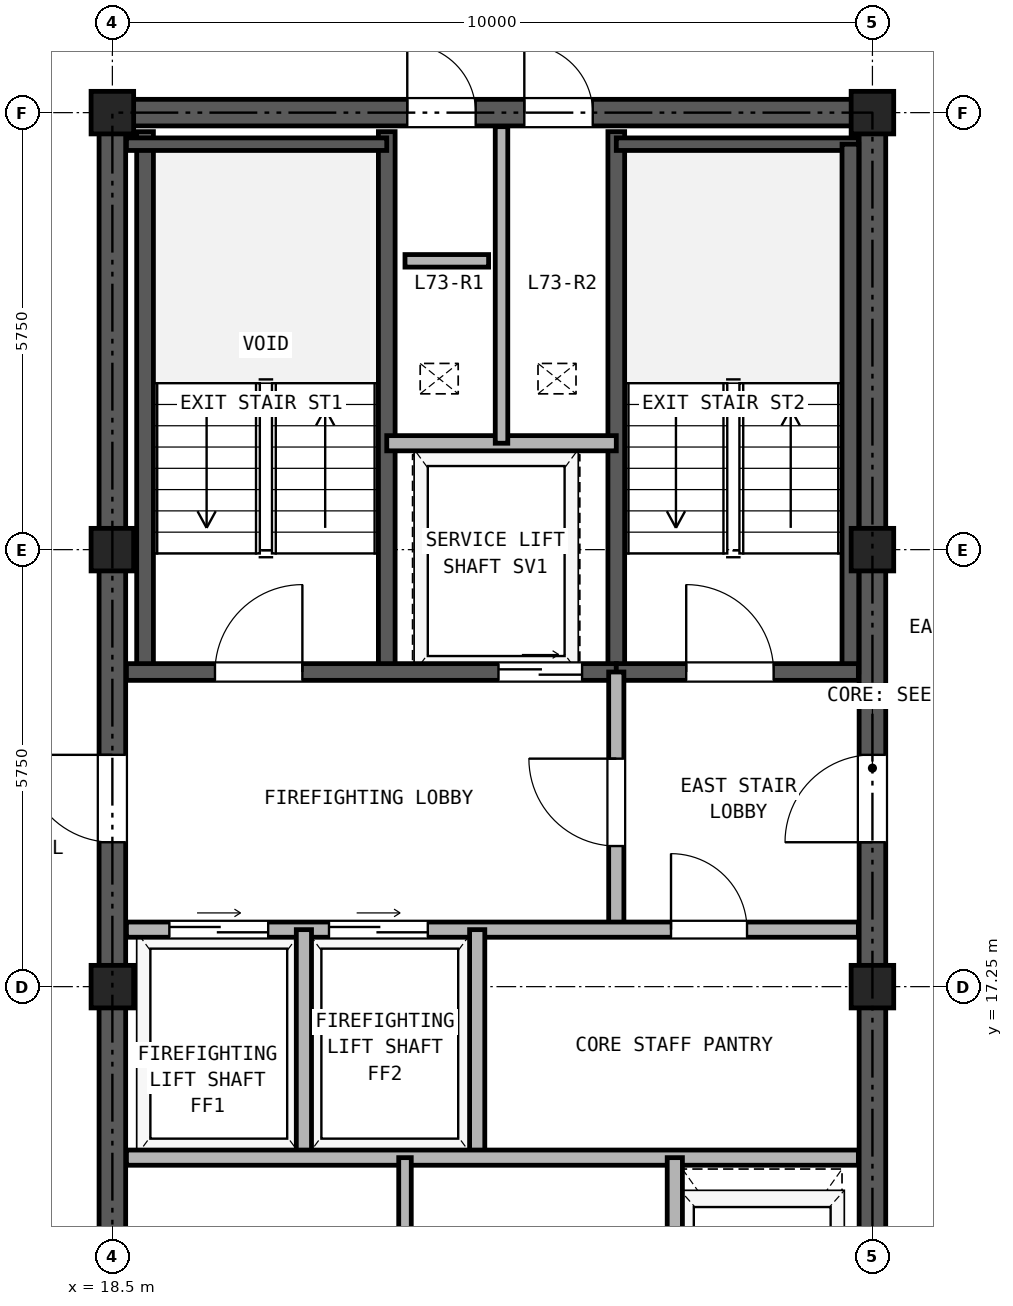
"""IFC4 building model, lengths in metres.
Left out: names, types, materials, properties, quantities, classifications, styles, units other than length and angle.
Written with IfcOpenShell. Run it as: python <this file> out.ifc"""

import sys

from ifc_helpers import new_model, si_unit, direction, frame, frame_2d, origin, origin_2d, place, context, subcontext, project, spatial, rectangle, hollow_rectangle, extrude, source, transform, mapped, element, fill, save


model = new_model("IFC4")
c1 = context("Model", 3, precision=1e-05, world=origin(), true_north=direction((0.0, 1.0)))
c2 = subcontext(c1, "Body", "Model", "MODEL_VIEW")
j1 = project(units=[si_unit("LENGTHUNIT", "METRE"), si_unit("PLANEANGLEUNIT", "RADIAN")], contexts=[c1])
p1 = place(None, origin())
s1 = spatial("IfcSite", under=j1, at=p1, CompositionType="ELEMENT")
p2 = place(p1, origin())
s2 = spatial("IfcBuilding", under=s1, at=p2, CompositionType="ELEMENT")
p3 = place(p2, frame((0.0, 0.0, 255.3)))
s3 = spatial("IfcBuildingStorey", under=s2, at=p3, CompositionType="ELEMENT", Elevation=255.3)
m1 = source(origin(), c2, "Body", "SweptSolid", [
    extrude(hollow_rectangle(XDim=0.56, YDim=0.56, WallThickness=0.03, at=origin_2d()), origin(), (0.0, 0.0, 1.0), 2.98),
])
for number, where, z_axis, x_axis in (
    (1, (18.5, 17.25, 0.0), (0.0, 0.0, 1.0), (1.0, 0.0, 0.0)),
    (2, (18.5, 23.0, 0.0), (0.0, 0.0, 1.0), (1.0, 0.0, 0.0)),
    (3, (18.5, 28.75, 0.0), (0.0, 0.0, 1.0), (1.0, 0.0, 0.0)),
    (4, (28.5, 17.25, 0.0), (0.0, 0.0, 1.0), (1.0, 0.0, 0.0)),
    (5, (28.5, 23.0, 0.0), (0.0, 0.0, 1.0), (1.0, 0.0, 0.0)),
    (6, (28.5, 28.75, 0.0), (0.0, 0.0, 1.0), (1.0, 0.0, 0.0)),
):
    element("IfcColumn", number, at=place(p3, frame(where, z_axis=z_axis, x_axis=x_axis)), inside=s3, PredefinedType="COLUMN", context=c2, shape_type="MappedRepresentation", body=[
        mapped(m1, transform((0.0, 0.0, 0.0), x_axis=(1.0, 0.0, 0.0), y_axis=(0.0, 1.0, 0.0), z_axis=(0.0, 0.0, 1.0), scale=1.0)),
    ])
p4 = place(p3, frame((18.325, 28.75, 0.0), z_axis=(0.0, 0.0, 1.0), x_axis=(1.0, 0.0, 0.0)))
e7 = element("IfcWall", 7, at=p4, inside=s3, PredefinedType="SHEAR", context=c2, shape_type="SweptSolid", body=[
    extrude(rectangle(XDim=10.35, YDim=0.35, at=frame_2d((5.175, 0.0))), origin(), (0.0, 0.0, 1.0), 2.98),
])
p5 = place(p4, frame((4.055, 0.0, 0.0)))
e8 = element("IfcOpeningElement", 8, at=p5, cuts=e7, PredefinedType="OPENING", context=c2, shape_type="SweptSolid", body=[
    extrude(rectangle(XDim=0.9, YDim=2.05, at=frame_2d((0.45, 1.025))), frame((0.0, 0.185, 0.0), z_axis=(0.0, -1.0, 0.0), x_axis=(1.0, 0.0, 0.0)), (0.0, 0.0, 1.0), 0.37),
])
p6 = place(p4, frame((5.595, 0.0, 0.0)))
e9 = element("IfcOpeningElement", 9, at=p6, cuts=e7, PredefinedType="OPENING", context=c2, shape_type="SweptSolid", body=[
    extrude(rectangle(XDim=0.9, YDim=2.05, at=frame_2d((0.45, 1.025))), frame((0.0, 0.185, 0.0), z_axis=(0.0, -1.0, 0.0), x_axis=(1.0, 0.0, 0.0)), (0.0, 0.0, 1.0), 0.37),
])
p7 = place(p3, frame((18.5, 11.675, 0.0), z_axis=(0.0, 0.0, 1.0), x_axis=(0.0, 1.0, 0.0)))
e10 = element("IfcWall", 10, at=p7, inside=s3, PredefinedType="SHEAR", context=c2, shape_type="SweptSolid", body=[
    extrude(rectangle(XDim=16.9, YDim=0.35, at=frame_2d((8.45, 0.0))), origin(), (0.0, 0.0, 1.0), 2.98),
])
p8 = place(p7, frame((7.475, 0.0, 0.0)))
e11 = element("IfcOpeningElement", 11, at=p8, cuts=e10, PredefinedType="OPENING", context=c2, shape_type="SweptSolid", body=[
    extrude(rectangle(XDim=1.15, YDim=2.2, at=frame_2d((0.575, 1.1))), frame((0.0, 0.185, 0.0), z_axis=(0.0, -1.0, 0.0), x_axis=(1.0, 0.0, 0.0)), (0.0, 0.0, 1.0), 0.37),
])
p9 = place(p3, frame((28.5, 11.675, 0.0), z_axis=(0.0, 0.0, 1.0), x_axis=(0.0, 1.0, 0.0)))
e12 = element("IfcWall", 12, at=p9, inside=s3, PredefinedType="SHEAR", context=c2, shape_type="SweptSolid", body=[
    extrude(rectangle(XDim=16.9, YDim=0.35, at=frame_2d((8.45, 0.0))), origin(), (0.0, 0.0, 1.0), 2.98),
])
p10 = place(p9, frame((7.475, 0.0, 0.0)))
e13 = element("IfcOpeningElement", 13, at=p10, cuts=e12, PredefinedType="OPENING", context=c2, shape_type="SweptSolid", body=[
    extrude(rectangle(XDim=1.15, YDim=2.2, at=frame_2d((0.575, 1.1))), frame((0.0, 0.185, 0.0), z_axis=(0.0, -1.0, 0.0), x_axis=(1.0, 0.0, 0.0)), (0.0, 0.0, 1.0), 0.37),
])
for number, where, z_axis, x_axis in (
    (14, (18.93, 21.39, 0.0), (0.0, 0.0, 1.0), (0.0, 1.0, 0.0)),
    (15, (22.11, 21.39, 0.0), (0.0, 0.0, 1.0), (0.0, 1.0, 0.0)),
    (16, (25.13, 21.39, 0.0), (0.0, 0.0, 1.0), (0.0, 1.0, 0.0)),
):
    element("IfcWall", number, at=place(p3, frame(where, z_axis=z_axis, x_axis=x_axis)), inside=s3, PredefinedType="SOLIDWALL", context=c2, shape_type="SweptSolid", body=[
        extrude(rectangle(XDim=7.11, YDim=0.22, at=frame_2d((3.555, 0.0))), origin(), (0.0, 0.0, 1.0), 2.98),
    ])
p11 = place(p3, frame((18.685, 28.335, 0.0), z_axis=(0.0, 0.0, 1.0), x_axis=(1.0, 0.0, 0.0)))
e17 = element("IfcWall", 17, at=p11, inside=s3, PredefinedType="PARTITIONING", context=c2, shape_type="SweptSolid", body=[
    extrude(rectangle(XDim=3.425, YDim=0.165, at=frame_2d((1.712, 0.0))), origin(), (0.0, 0.0, 1.0), 2.98),
])
p12 = place(p3, frame((25.13, 28.335, 0.0), z_axis=(0.0, 0.0, 1.0), x_axis=(1.0, 0.0, 0.0)))
e18 = element("IfcWall", 18, at=p12, inside=s3, PredefinedType="PARTITIONING", context=c2, shape_type="SweptSolid", body=[
    extrude(rectangle(XDim=3.185, YDim=0.165, at=frame_2d((1.593, 0.0))), origin(), (0.0, 0.0, 1.0), 2.98),
])
p13 = place(p3, frame((28.21, 21.39, 0.0), z_axis=(0.0, 0.0, 1.0), x_axis=(0.0, 1.0, 0.0)))
e19 = element("IfcWall", 19, at=p13, inside=s3, PredefinedType="SOLIDWALL", context=c2, shape_type="SweptSolid", body=[
    extrude(rectangle(XDim=6.945, YDim=0.22, at=frame_2d((3.473, 0.0))), origin(), (0.0, 0.0, 1.0), 2.98),
])
p14 = place(p3, frame((18.685, 21.39, 0.0), z_axis=(0.0, 0.0, 1.0), x_axis=(1.0, 0.0, 0.0)))
e20 = element("IfcWall", 20, at=p14, inside=s3, PredefinedType="SOLIDWALL", context=c2, shape_type="SweptSolid", body=[
    extrude(rectangle(XDim=6.445, YDim=0.22, at=frame_2d((3.222, 0.0))), origin(), (0.0, 0.0, 1.0), 2.98),
])
p15 = place(p14, frame((1.165, 0.0, 0.0)))
e21 = element("IfcOpeningElement", 21, at=p15, cuts=e20, PredefinedType="OPENING", context=c2, shape_type="SweptSolid", body=[
    extrude(rectangle(XDim=1.15, YDim=2.2, at=frame_2d((0.575, 1.1))), frame((0.0, 0.12, 0.0), z_axis=(0.0, -1.0, 0.0), x_axis=(1.0, 0.0, 0.0)), (0.0, 0.0, 1.0), 0.24),
])
p16 = place(p14, frame((4.895, 0.0, 0.0)))
e22 = element("IfcOpeningElement", 22, at=p16, cuts=e20, PredefinedType="OPENING", context=c2, shape_type="SweptSolid", body=[
    extrude(rectangle(XDim=1.1, YDim=2.25, at=frame_2d((0.55, 1.125))), frame((0.0, 0.12, 0.0), z_axis=(0.0, -1.0, 0.0), x_axis=(1.0, 0.0, 0.0)), (0.0, 0.0, 1.0), 0.24),
])
p17 = place(p3, frame((25.13, 21.39, 0.0), z_axis=(0.0, 0.0, 1.0), x_axis=(1.0, 0.0, 0.0)))
e23 = element("IfcWall", 23, at=p17, inside=s3, PredefinedType="SOLIDWALL", context=c2, shape_type="SweptSolid", body=[
    extrude(rectangle(XDim=3.185, YDim=0.22, at=frame_2d((1.593, 0.0))), origin(), (0.0, 0.0, 1.0), 2.98),
])
p18 = place(p17, frame((0.92, 0.0, 0.0)))
e24 = element("IfcOpeningElement", 24, at=p18, cuts=e23, PredefinedType="OPENING", context=c2, shape_type="SweptSolid", body=[
    extrude(rectangle(XDim=1.15, YDim=2.2, at=frame_2d((0.575, 1.1))), frame((0.0, 0.12, 0.0), z_axis=(0.0, -1.0, 0.0), x_axis=(1.0, 0.0, 0.0)), (0.0, 0.0, 1.0), 0.24),
])
p19 = place(p3, frame((22.11, 24.4, 0.0), z_axis=(0.0, 0.0, 1.0), x_axis=(1.0, 0.0, 0.0)))
e25 = element("IfcWall", 25, at=p19, inside=s3, PredefinedType="PARTITIONING", context=c2, shape_type="SweptSolid", body=[
    extrude(rectangle(XDim=3.02, YDim=0.2, at=frame_2d((1.51, 0.0))), origin(), (0.0, 0.0, 1.0), 2.98),
])
p20 = place(p3, frame((23.62, 24.4, 0.0), z_axis=(0.0, 0.0, 1.0), x_axis=(0.0, 1.0, 0.0)))
e26 = element("IfcWall", 26, at=p20, inside=s3, PredefinedType="PARTITIONING", context=c2, shape_type="SweptSolid", body=[
    extrude(rectangle(XDim=4.165, YDim=0.165, at=frame_2d((2.083, 0.0))), origin(), (0.0, 0.0, 1.0), 2.98),
])
p21 = place(p3, frame((25.13, 18.0, 0.0), z_axis=(0.0, 0.0, 1.0), x_axis=(0.0, 1.0, 0.0)))
e27 = element("IfcWall", 27, at=p21, inside=s3, PredefinedType="PARTITIONING", context=c2, shape_type="SweptSolid", body=[
    extrude(rectangle(XDim=3.39, YDim=0.2, at=frame_2d((1.695, 0.0))), origin(), (0.0, 0.0, 1.0), 2.98),
])
p22 = place(p21, frame((1.1, 0.0, 0.0)))
e28 = element("IfcOpeningElement", 28, at=p22, cuts=e27, PredefinedType="OPENING", context=c2, shape_type="SweptSolid", body=[
    extrude(rectangle(XDim=1.15, YDim=2.2, at=frame_2d((0.575, 1.1))), frame((0.0, 0.11, 0.0), z_axis=(0.0, -1.0, 0.0), x_axis=(1.0, 0.0, 0.0)), (0.0, 0.0, 1.0), 0.22),
])
p23 = place(p3, frame((18.685, 18.0, 0.0), z_axis=(0.0, 0.0, 1.0), x_axis=(1.0, 0.0, 0.0)))
e29 = element("IfcWall", 29, at=p23, inside=s3, PredefinedType="PARTITIONING", context=c2, shape_type="SweptSolid", body=[
    extrude(rectangle(XDim=9.63, YDim=0.2, at=frame_2d((4.815, 0.0))), origin(), (0.0, 0.0, 1.0), 2.98),
])
p24 = place(p23, frame((0.565, 0.0, 0.0)))
e30 = element("IfcOpeningElement", 30, at=p24, cuts=e29, PredefinedType="OPENING", context=c2, shape_type="SweptSolid", body=[
    extrude(rectangle(XDim=1.3, YDim=2.3, at=frame_2d((0.65, 1.15))), frame((0.0, 0.11, 0.0), z_axis=(0.0, -1.0, 0.0), x_axis=(1.0, 0.0, 0.0)), (0.0, 0.0, 1.0), 0.22),
])
p25 = place(p23, frame((2.665, 0.0, 0.0)))
e31 = element("IfcOpeningElement", 31, at=p25, cuts=e29, PredefinedType="OPENING", context=c2, shape_type="SweptSolid", body=[
    extrude(rectangle(XDim=1.3, YDim=2.3, at=frame_2d((0.65, 1.15))), frame((0.0, 0.11, 0.0), z_axis=(0.0, -1.0, 0.0), x_axis=(1.0, 0.0, 0.0)), (0.0, 0.0, 1.0), 0.22),
])
p26 = place(p23, frame((7.165, 0.0, 0.0)))
e32 = element("IfcOpeningElement", 32, at=p26, cuts=e29, PredefinedType="OPENING", context=c2, shape_type="SweptSolid", body=[
    extrude(rectangle(XDim=1.0, YDim=2.15, at=frame_2d((0.5, 1.075))), frame((0.0, 0.11, 0.0), z_axis=(0.0, -1.0, 0.0), x_axis=(1.0, 0.0, 0.0)), (0.0, 0.0, 1.0), 0.22),
])
for number, where, z_axis, x_axis in (
    (33, (21.02, 15.0, 0.0), (0.0, 0.0, 1.0), (0.0, 1.0, 0.0)),
    (34, (23.3, 15.0, 0.0), (0.0, 0.0, 1.0), (0.0, 1.0, 0.0)),
):
    element("IfcWall", number, at=place(p3, frame(where, z_axis=z_axis, x_axis=x_axis)), inside=s3, PredefinedType="PARTITIONING", context=c2, shape_type="SweptSolid", body=[
        extrude(rectangle(XDim=3.0, YDim=0.2, at=frame_2d((1.5, 0.0))), origin(), (0.0, 0.0, 1.0), 2.98),
    ])
p27 = place(p3, frame((18.685, 15.0, 0.0), z_axis=(0.0, 0.0, 1.0), x_axis=(1.0, 0.0, 0.0)))
e35 = element("IfcWall", 35, at=p27, inside=s3, PredefinedType="PARTITIONING", context=c2, shape_type="SweptSolid", body=[
    extrude(rectangle(XDim=9.63, YDim=0.2, at=frame_2d((4.815, 0.0))), origin(), (0.0, 0.0, 1.0), 2.98),
])
p28 = place(p3, frame((22.35, 11.685, 0.0), z_axis=(0.0, 0.0, 1.0), x_axis=(0.0, 1.0, 0.0)))
e36 = element("IfcWall", 36, at=p28, inside=s3, PredefinedType="PARTITIONING", context=c2, shape_type="SweptSolid", body=[
    extrude(rectangle(XDim=3.315, YDim=0.165, at=frame_2d((1.657, 0.0))), origin(), (0.0, 0.0, 1.0), 2.98),
])
p29 = place(p3, frame((25.9, 11.685, 0.0), z_axis=(0.0, 0.0, 1.0), x_axis=(0.0, 1.0, 0.0)))
e37 = element("IfcWall", 37, at=p29, inside=s3, PredefinedType="PARTITIONING", context=c2, shape_type="SweptSolid", body=[
    extrude(rectangle(XDim=3.315, YDim=0.2, at=frame_2d((1.657, 0.0))), origin(), (0.0, 0.0, 1.0), 2.98),
])
p30 = place(p3, frame((22.35, 26.8, 0.0), z_axis=(0.0, 0.0, 1.0), x_axis=(1.0, 0.0, 0.0)))
e38 = element("IfcWall", 38, at=p30, inside=s3, PredefinedType="PARTITIONING", context=c2, shape_type="SweptSolid", body=[
    extrude(rectangle(XDim=1.1, YDim=0.165, at=frame_2d((0.55, 0.0))), origin(), (0.0, 0.0, 1.0), 2.98),
])
p31 = place(p15, frame((1.15, 0.0, 0.0), z_axis=(0.0, 0.0, 1.0), x_axis=(-1.0, 0.0, 0.0)))
e39 = element("IfcDoor", 39, at=p31, inside=s3, OperationType="SINGLE_SWING_RIGHT", PredefinedType="DOOR", context=c2, shape_type="SweptSolid", body=[
    extrude(rectangle(XDim=1.15, YDim=2.2, at=frame_2d((0.575, 1.1))), frame((0.0, 0.025, 0.0), z_axis=(0.0, -1.0, 0.0), x_axis=(1.0, 0.0, 0.0)), (0.0, 0.0, 1.0), 0.05),
])
fill(e21, e39)
p32 = place(p18, frame((1.15, 0.0, 0.0), z_axis=(0.0, 0.0, 1.0), x_axis=(-1.0, 0.0, 0.0)))
e40 = element("IfcDoor", 40, at=p32, inside=s3, OperationType="SINGLE_SWING_LEFT", PredefinedType="DOOR", context=c2, shape_type="SweptSolid", body=[
    extrude(rectangle(XDim=1.15, YDim=2.2, at=frame_2d((0.575, 1.1))), frame((0.0, 0.025, 0.0), z_axis=(0.0, -1.0, 0.0), x_axis=(1.0, 0.0, 0.0)), (0.0, 0.0, 1.0), 0.05),
])
fill(e24, e40)
p33 = place(p16, frame((1.1, 0.0, 0.0), z_axis=(0.0, 0.0, 1.0), x_axis=(-1.0, 0.0, 0.0)))
e41 = element("IfcDoor", 41, at=p33, inside=s3, OperationType="DOUBLE_DOOR_SLIDING", PredefinedType="DOOR", context=c2, shape_type="SweptSolid", body=[
    extrude(rectangle(XDim=1.1, YDim=2.25, at=frame_2d((0.55, 1.125))), frame((0.0, 0.025, 0.0), z_axis=(0.0, -1.0, 0.0), x_axis=(1.0, 0.0, 0.0)), (0.0, 0.0, 1.0), 0.05),
])
fill(e22, e41)
p34 = place(p22, origin())
e42 = element("IfcDoor", 42, at=p34, inside=s3, OperationType="SINGLE_SWING_RIGHT", PredefinedType="DOOR", context=c2, shape_type="SweptSolid", body=[
    extrude(rectangle(XDim=1.15, YDim=2.2, at=frame_2d((0.575, 1.1))), frame((0.0, 0.025, 0.0), z_axis=(0.0, -1.0, 0.0), x_axis=(1.0, 0.0, 0.0)), (0.0, 0.0, 1.0), 0.05),
])
fill(e28, e42)
p35 = place(p24, origin())
e43 = element("IfcDoor", 43, at=p35, inside=s3, OperationType="DOUBLE_DOOR_SLIDING", PredefinedType="DOOR", context=c2, shape_type="SweptSolid", body=[
    extrude(rectangle(XDim=1.3, YDim=2.3, at=frame_2d((0.65, 1.15))), frame((0.0, 0.025, 0.0), z_axis=(0.0, -1.0, 0.0), x_axis=(1.0, 0.0, 0.0)), (0.0, 0.0, 1.0), 0.05),
])
fill(e30, e43)
p36 = place(p25, origin())
e44 = element("IfcDoor", 44, at=p36, inside=s3, OperationType="DOUBLE_DOOR_SLIDING", PredefinedType="DOOR", context=c2, shape_type="SweptSolid", body=[
    extrude(rectangle(XDim=1.3, YDim=2.3, at=frame_2d((0.65, 1.15))), frame((0.0, 0.025, 0.0), z_axis=(0.0, -1.0, 0.0), x_axis=(1.0, 0.0, 0.0)), (0.0, 0.0, 1.0), 0.05),
])
fill(e31, e44)
p37 = place(p26, frame((1.0, 0.0, 0.0), z_axis=(0.0, 0.0, 1.0), x_axis=(-1.0, 0.0, 0.0)))
e45 = element("IfcDoor", 45, at=p37, inside=s3, OperationType="SINGLE_SWING_LEFT", PredefinedType="DOOR", context=c2, shape_type="SweptSolid", body=[
    extrude(rectangle(XDim=1.0, YDim=2.15, at=frame_2d((0.5, 1.075))), frame((0.0, 0.025, 0.0), z_axis=(0.0, -1.0, 0.0), x_axis=(1.0, 0.0, 0.0)), (0.0, 0.0, 1.0), 0.05),
])
fill(e32, e45)
p38 = place(p8, frame((1.15, 0.0, 0.0), z_axis=(0.0, 0.0, 1.0), x_axis=(-1.0, 0.0, 0.0)))
e46 = element("IfcDoor", 46, at=p38, inside=s3, OperationType="SINGLE_SWING_RIGHT", PredefinedType="DOOR", context=c2, shape_type="SweptSolid", body=[
    extrude(rectangle(XDim=1.15, YDim=2.2, at=frame_2d((0.575, 1.1))), frame((0.0, 0.025, 0.0), z_axis=(0.0, -1.0, 0.0), x_axis=(1.0, 0.0, 0.0)), (0.0, 0.0, 1.0), 0.05),
])
fill(e11, e46)
p39 = place(p10, origin())
e47 = element("IfcDoor", 47, at=p39, inside=s3, OperationType="SINGLE_SWING_LEFT", PredefinedType="DOOR", context=c2, shape_type="SweptSolid", body=[
    extrude(rectangle(XDim=1.15, YDim=2.2, at=frame_2d((0.575, 1.1))), frame((0.0, 0.025, 0.0), z_axis=(0.0, -1.0, 0.0), x_axis=(1.0, 0.0, 0.0)), (0.0, 0.0, 1.0), 0.05),
])
fill(e13, e47)
p40 = place(p5, origin())
e48 = element("IfcDoor", 48, at=p40, inside=s3, OperationType="SINGLE_SWING_LEFT", PredefinedType="DOOR", context=c2, shape_type="SweptSolid", body=[
    extrude(rectangle(XDim=0.9, YDim=2.05, at=frame_2d((0.45, 1.025))), frame((0.0, 0.025, 0.0), z_axis=(0.0, -1.0, 0.0), x_axis=(1.0, 0.0, 0.0)), (0.0, 0.0, 1.0), 0.05),
])
fill(e8, e48)
p41 = place(p6, origin())
e49 = element("IfcDoor", 49, at=p41, inside=s3, OperationType="SINGLE_SWING_LEFT", PredefinedType="DOOR", context=c2, shape_type="SweptSolid", body=[
    extrude(rectangle(XDim=0.9, YDim=2.05, at=frame_2d((0.45, 1.025))), frame((0.0, 0.025, 0.0), z_axis=(0.0, -1.0, 0.0), x_axis=(1.0, 0.0, 0.0)), (0.0, 0.0, 1.0), 0.05),
])
fill(e9, e49)
save(model, sys.argv[1])
